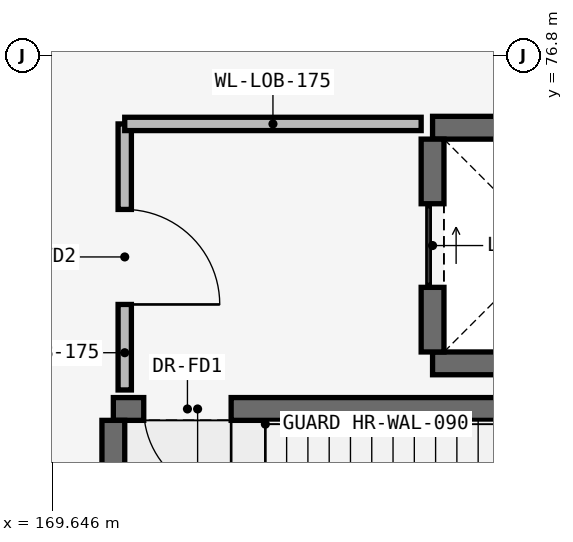
"""IFC4 building model, lengths in metres.
Left out: names, types, materials, properties, quantities, classifications, styles, units other than length and angle.
Written with IfcOpenShell. Run it as: python <this file> out.ifc"""

import sys

from ifc_helpers import new_model, si_unit, direction, frame, frame_2d, origin, place, context, subcontext, project, spatial, rectangle, extrude, element, fill, save


model = new_model("IFC4")
c1 = context("Model", 3, precision=1e-05, world=origin(), true_north=direction((0.0, 1.0)))
c2 = subcontext(c1, "Body", "Model", "MODEL_VIEW")
j1 = project(units=[si_unit("LENGTHUNIT", "METRE"), si_unit("PLANEANGLEUNIT", "RADIAN")], contexts=[c1])
p1 = place(None, origin())
s1 = spatial("IfcSite", under=j1, at=p1, CompositionType="ELEMENT")
p2 = place(p1, origin())
s2 = spatial("IfcBuilding", under=s1, at=p2, CompositionType="ELEMENT")
p3 = place(p2, frame((0.0, 0.0, 5.4)))
s3 = spatial("IfcBuildingStorey", under=s2, at=p3, CompositionType="ELEMENT", Elevation=5.4)
p4 = place(p3, frame((170.45, 72.15, 0.0), z_axis=(0.0, 0.0, 1.0), x_axis=(1.0, 0.0, 0.0)))
e1 = element("IfcWall", 1, at=p4, inside=s3, PredefinedType="SHEAR", context=c2, shape_type="SweptSolid", body=[
    extrude(rectangle(XDim=7.92, YDim=0.3, at=frame_2d((3.96, 0.0))), origin(), (0.0, 0.0, 1.0), 4.52),
])
p5 = place(p4, frame((0.4, 0.0, 0.0)))
e2 = element("IfcOpeningElement", 2, at=p5, cuts=e1, PredefinedType="OPENING", context=c2, shape_type="SweptSolid", body=[
    extrude(rectangle(XDim=1.15, YDim=2.15, at=frame_2d((0.575, 1.075))), frame((0.0, 0.165, 0.0), z_axis=(0.0, -1.0, 0.0), x_axis=(1.0, 0.0, 0.0)), (0.0, 0.0, 1.0), 0.33),
])
p6 = place(p3, frame((170.45, 68.1, 0.0), z_axis=(0.0, 0.0, 1.0), x_axis=(0.0, 1.0, 0.0)))
e3 = element("IfcWall", 3, at=p6, inside=s3, PredefinedType="SHEAR", context=c2, shape_type="SweptSolid", body=[
    extrude(rectangle(XDim=3.9, YDim=0.3, at=frame_2d((1.95, 0.0))), origin(), (0.0, 0.0, 1.0), 4.52),
])
for number, where, z_axis, x_axis in (
    (4, (174.65, 72.75, 0.0), (0.0, 0.0, 1.0), (1.0, 0.0, 0.0)),
    (5, (174.65, 75.85, 0.0), (0.0, 0.0, 1.0), (1.0, 0.0, 0.0)),
):
    element("IfcWall", number, at=place(p3, frame(where, z_axis=z_axis, x_axis=x_axis)), inside=s3, PredefinedType="SHEAR", context=c2, shape_type="SweptSolid", body=[
        extrude(rectangle(XDim=3.1, YDim=0.3, at=frame_2d((1.55, 0.0))), origin(), (0.0, 0.0, 1.0), 4.52),
    ])
p7 = place(p3, frame((174.65, 72.9, 0.0), z_axis=(0.0, 0.0, 1.0), x_axis=(0.0, 1.0, 0.0)))
e6 = element("IfcWall", 6, at=p7, inside=s3, PredefinedType="SHEAR", context=c2, shape_type="SweptSolid", body=[
    extrude(rectangle(XDim=2.8, YDim=0.3, at=frame_2d((1.4, 0.0))), origin(), (0.0, 0.0, 1.0), 4.52),
])
p8 = place(p7, frame((0.85, 0.0, 0.0)))
e7 = element("IfcOpeningElement", 7, at=p8, cuts=e6, PredefinedType="OPENING", context=c2, shape_type="SweptSolid", body=[
    extrude(rectangle(XDim=1.1, YDim=2.15, at=frame_2d((0.55, 1.075))), frame((0.0, 0.165, 0.0), z_axis=(0.0, -1.0, 0.0), x_axis=(1.0, 0.0, 0.0)), (0.0, 0.0, 1.0), 0.33),
])
p9 = place(p3, frame((170.6, 72.4, 0.0), z_axis=(0.0, 0.0, 1.0), x_axis=(0.0, 1.0, 0.0)))
e8 = element("IfcWall", 8, at=p9, inside=s3, PredefinedType="PARTITIONING", context=c2, shape_type="SweptSolid", body=[
    extrude(rectangle(XDim=3.5, YDim=0.175, at=frame_2d((1.75, 0.0))), origin(), (0.0, 0.0, 1.0), 4.52),
])
p10 = place(p9, frame((1.125, 0.0, 0.0)))
e9 = element("IfcOpeningElement", 9, at=p10, cuts=e8, PredefinedType="OPENING", context=c2, shape_type="SweptSolid", body=[
    extrude(rectangle(XDim=1.25, YDim=2.2, at=frame_2d((0.625, 1.1))), frame((0.0, 0.103, 0.0), z_axis=(0.0, -1.0, 0.0), x_axis=(1.0, 0.0, 0.0)), (0.0, 0.0, 1.0), 0.205),
])
p11 = place(p3, frame((170.6, 75.9, 0.0), z_axis=(0.0, 0.0, 1.0), x_axis=(1.0, 0.0, 0.0)))
e10 = element("IfcWall", 10, at=p11, inside=s3, PredefinedType="PARTITIONING", context=c2, shape_type="SweptSolid", body=[
    extrude(rectangle(XDim=3.9, YDim=0.175, at=frame_2d((1.95, 0.0))), origin(), (0.0, 0.0, 1.0), 4.52),
])
p12 = place(p5, frame((1.15, 0.0, 0.0), z_axis=(0.0, 0.0, 1.0), x_axis=(-1.0, 0.0, 0.0)))
e11 = element("IfcDoor", 11, at=p12, inside=s3, OperationType="SINGLE_SWING_RIGHT", PredefinedType="DOOR", context=c2, shape_type="SweptSolid", body=[
    extrude(rectangle(XDim=1.15, YDim=2.15, at=frame_2d((0.575, 1.075))), frame((0.0, 0.025, 0.0), z_axis=(0.0, -1.0, 0.0), x_axis=(1.0, 0.0, 0.0)), (0.0, 0.0, 1.0), 0.05),
])
fill(e2, e11)
p13 = place(p8, origin())
e12 = element("IfcDoor", 12, at=p13, inside=s3, OperationType="SLIDING_TO_LEFT", PredefinedType="DOOR", context=c2, shape_type="SweptSolid", body=[
    extrude(rectangle(XDim=1.1, YDim=2.15, at=frame_2d((0.55, 1.075))), frame((0.0, 0.025, 0.0), z_axis=(0.0, -1.0, 0.0), x_axis=(1.0, 0.0, 0.0)), (0.0, 0.0, 1.0), 0.05),
])
fill(e7, e12)
p14 = place(p10, frame((1.25, 0.0, 0.0), z_axis=(0.0, 0.0, 1.0), x_axis=(-1.0, 0.0, 0.0)))
e13 = element("IfcDoor", 13, at=p14, inside=s3, OperationType="SINGLE_SWING_LEFT", PredefinedType="DOOR", context=c2, shape_type="SweptSolid", body=[
    extrude(rectangle(XDim=1.25, YDim=2.2, at=frame_2d((0.625, 1.1))), frame((0.0, 0.025, 0.0), z_axis=(0.0, -1.0, 0.0), x_axis=(1.0, 0.0, 0.0)), (0.0, 0.0, 1.0), 0.05),
])
fill(e9, e13)
save(model, sys.argv[1])
